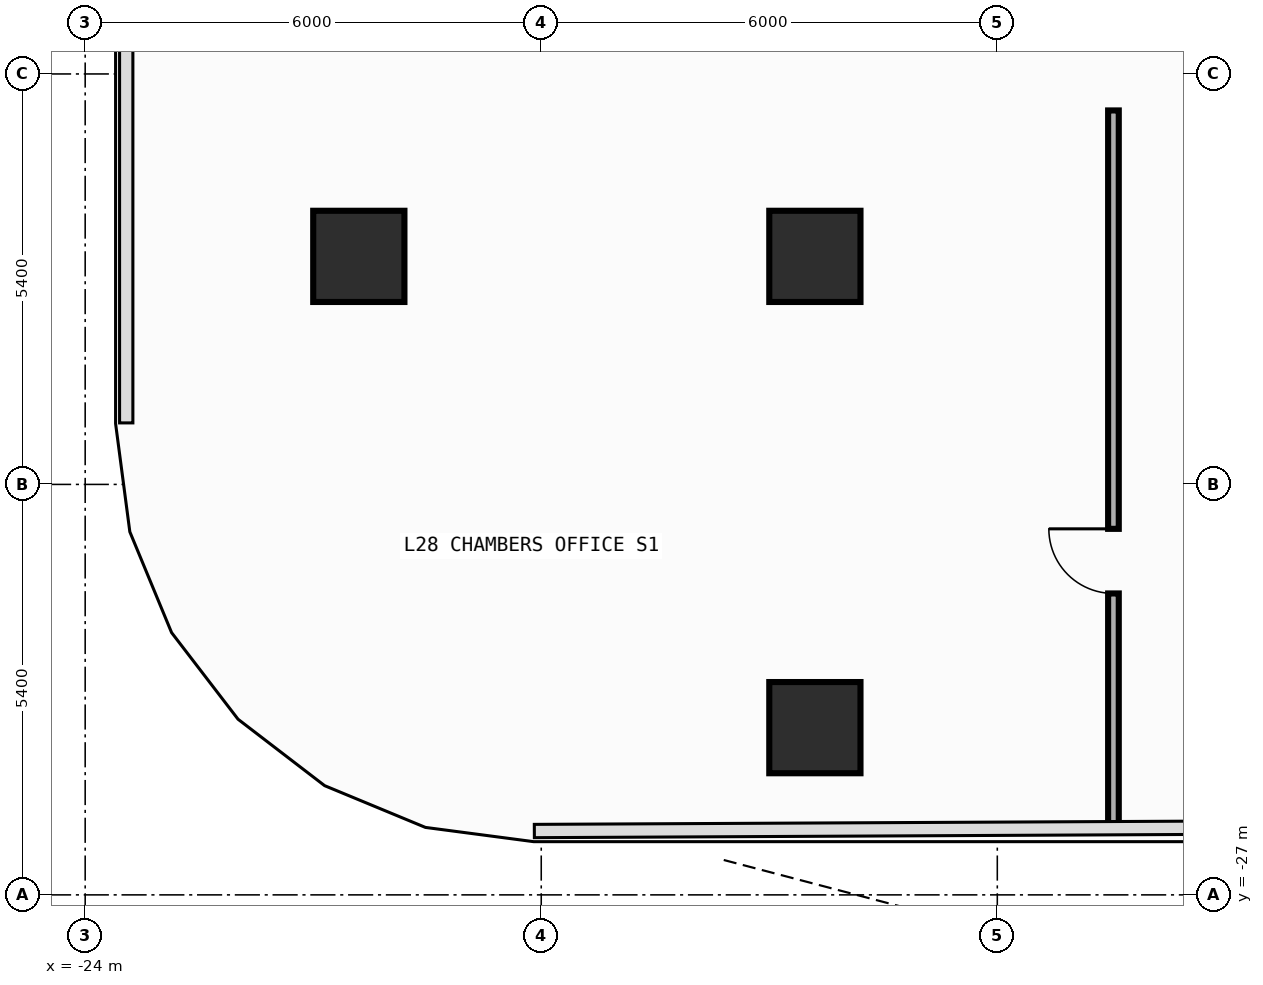
"""IFC4 building model, lengths in metres.
Left out: names, types, materials, properties, quantities, classifications, styles, units other than length and angle.
Written with IfcOpenShell. Run it as: python <this file> out.ifc"""

import sys

from ifc_helpers import new_model, si_unit, direction, frame, frame_2d, origin, origin_2d, place, context, subcontext, project, spatial, rectangle, extrude, element, fill, save


model = new_model("IFC4")
c1 = context("Model", 3, precision=1e-05, world=origin(), true_north=direction((0.0, 1.0)))
c2 = subcontext(c1, "Body", "Model", "MODEL_VIEW")
j1 = project(units=[si_unit("LENGTHUNIT", "METRE"), si_unit("PLANEANGLEUNIT", "RADIAN")], contexts=[c1])
p1 = place(None, origin())
s1 = spatial("IfcSite", under=j1, at=p1, CompositionType="ELEMENT")
p2 = place(p1, origin())
s2 = spatial("IfcBuilding", under=s1, at=p2, CompositionType="ELEMENT")
p3 = place(p2, frame((0.0, 0.0, 122.6)))
s3 = spatial("IfcBuildingStorey", under=s2, at=p3, CompositionType="ELEMENT", Elevation=122.6)
for number, where, z_axis, x_axis in (
    (1, (-20.4, -18.6, 0.0), (0.0, 0.0, 1.0), (1.0, 0.0, 0.0)),
    (2, (-14.4, -18.6, 0.0), (0.0, 0.0, 1.0), (1.0, 0.0, 0.0)),
    (3, (-14.4, -24.8, 0.0), (0.0, 0.0, 1.0), (1.0, 0.0, 0.0)),
):
    element("IfcColumn", number, at=place(p3, frame(where, z_axis=z_axis, x_axis=x_axis)), inside=s3, PredefinedType="COLUMN", context=c2, shape_type="SweptSolid", body=[
        extrude(rectangle(XDim=1.2, YDim=1.2, at=origin_2d()), origin(), (0.0, 0.0, 1.0), 4.2),
    ])
p4 = place(p3, frame((-10.472, -26.118, 0.0), z_axis=(0.0, 0.0, 1.0), x_axis=(0.0, 1.0, 0.0)))
e4 = element("IfcWall", 4, at=p4, inside=s3, PredefinedType="PARTITIONING", context=c2, shape_type="SweptSolid", body=[
    extrude(rectangle(XDim=9.438, YDim=0.14, at=frame_2d((4.719, 0.0))), origin(), (0.0, 0.0, 1.0), 3.94),
])
p5 = place(p4, frame((3.083, 0.0, 0.0)))
e5 = element("IfcOpeningElement", 5, at=p5, cuts=e4, PredefinedType="OPENING", context=c2, shape_type="SweptSolid", body=[
    extrude(rectangle(XDim=0.85, YDim=2.1, at=frame_2d((0.425, 1.05))), frame((0.0, 0.08, 0.0), z_axis=(0.0, -1.0, 0.0), x_axis=(1.0, 0.0, 0.0)), (0.0, 0.0, 1.0), 0.16),
])
p6 = place(p5, origin())
e6 = element("IfcDoor", 6, at=p6, inside=s3, OperationType="SINGLE_SWING_RIGHT", PredefinedType="DOOR", context=c2, shape_type="SweptSolid", body=[
    extrude(rectangle(XDim=0.85, YDim=2.1, at=frame_2d((0.425, 1.05))), frame((0.0, 0.025, 0.0), z_axis=(0.0, -1.0, 0.0), x_axis=(1.0, 0.0, 0.0)), (0.0, 0.0, 1.0), 0.05),
])
fill(e5, e6)
save(model, sys.argv[1])
